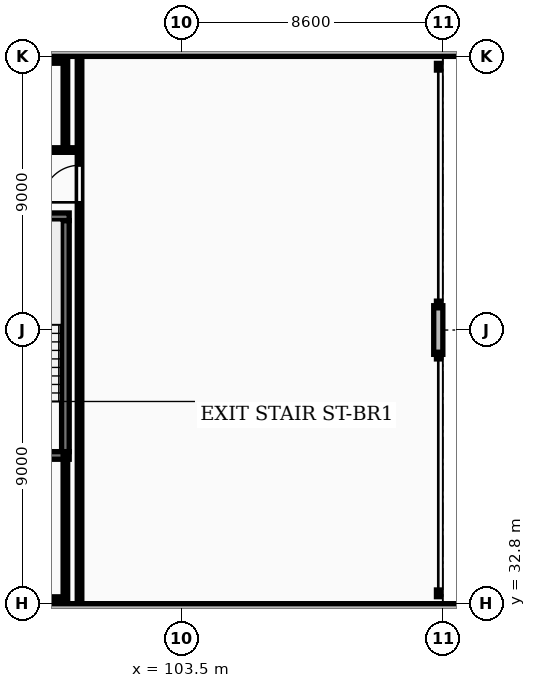
"""IFC4 building model, lengths in metres.
Left out: names, types, materials, properties, quantities, classifications, styles, units other than length and angle.
Written with IfcOpenShell. Run it as: python <this file> out.ifc"""

import sys

from ifc_helpers import new_model, si_unit, direction, frame, frame_2d, origin, place, context, subcontext, project, spatial, rectangle, extrude, element, fill, save


model = new_model("IFC4")
c1 = context("Model", 3, precision=1e-05, world=origin(), true_north=direction((0.0, 1.0)))
c2 = subcontext(c1, "Body", "Model", "MODEL_VIEW")
j1 = project(units=[si_unit("LENGTHUNIT", "METRE"), si_unit("PLANEANGLEUNIT", "RADIAN")], contexts=[c1])
p1 = place(None, origin())
s1 = spatial("IfcSite", under=j1, at=p1, CompositionType="ELEMENT")
p2 = place(p1, origin())
s2 = spatial("IfcBuilding", under=s1, at=p2, CompositionType="ELEMENT")
p3 = place(p2, frame((0.0, 0.0, 150.1)))
s3 = spatial("IfcBuildingStorey", under=s2, at=p3, CompositionType="ELEMENT", Elevation=150.1)
p4 = place(p3, frame((57.6, 50.95, 0.0), z_axis=(0.0, 0.0, 1.0), x_axis=(1.0, 0.0, 0.0)))
e1 = element("IfcWall", 1, at=p4, inside=s3, PredefinedType="STANDARD", context=c2, shape_type="SweptSolid", body=[
    extrude(rectangle(XDim=73.0, YDim=0.3, at=frame_2d((36.5, 0.0))), origin(), (0.0, 0.0, 1.0), 3.31),
])
p5 = place(p4, frame((15.225, 0.0, 0.85)))
e2 = element("IfcOpeningElement", 2, at=p5, cuts=e1, PredefinedType="OPENING", context=c2, shape_type="SweptSolid", body=[
    extrude(rectangle(XDim=1.8, YDim=1.8, at=frame_2d((0.9, 0.9))), frame((0.0, 0.16, 0.0), z_axis=(0.0, -1.0, 0.0), x_axis=(1.0, 0.0, 0.0)), (0.0, 0.0, 1.0), 0.32),
])
p6 = place(p4, frame((58.575, 0.0, 0.85)))
e3 = element("IfcOpeningElement", 3, at=p6, cuts=e1, PredefinedType="OPENING", context=c2, shape_type="SweptSolid", body=[
    extrude(rectangle(XDim=1.8, YDim=1.8, at=frame_2d((0.9, 0.9))), frame((0.0, 0.16, 0.0), z_axis=(0.0, -1.0, 0.0), x_axis=(1.0, 0.0, 0.0)), (0.0, 0.0, 1.0), 0.32),
])
p7 = place(p4, frame((33.45, 0.0, 0.0)))
e4 = element("IfcOpeningElement", 4, at=p7, cuts=e1, PredefinedType="OPENING", context=c2, shape_type="SweptSolid", body=[
    extrude(rectangle(XDim=1.1, YDim=2.1, at=frame_2d((0.55, 1.05))), frame((0.0, 0.16, 0.0), z_axis=(0.0, -1.0, 0.0), x_axis=(1.0, 0.0, 0.0)), (0.0, 0.0, 1.0), 0.32),
])
p8 = place(p3, frame((130.7, 32.65, 0.0), z_axis=(0.0, 0.0, 1.0), x_axis=(-1.0, 0.0, 0.0)))
e5 = element("IfcWall", 5, at=p8, inside=s3, PredefinedType="STANDARD", context=c2, shape_type="SweptSolid", body=[
    extrude(rectangle(XDim=58.0, YDim=0.3, at=frame_2d((29.0, 0.0))), origin(), (0.0, 0.0, 1.0), 3.31),
])
p9 = place(p8, frame((50.125, 0.0, 0.85)))
e6 = element("IfcOpeningElement", 6, at=p9, cuts=e5, PredefinedType="OPENING", context=c2, shape_type="SweptSolid", body=[
    extrude(rectangle(XDim=1.8, YDim=1.8, at=frame_2d((0.9, 0.9))), frame((0.0, 0.16, 0.0), z_axis=(0.0, -1.0, 0.0), x_axis=(1.0, 0.0, 0.0)), (0.0, 0.0, 1.0), 0.32),
])
p10 = place(p8, frame((6.775, 0.0, 0.85)))
e7 = element("IfcOpeningElement", 7, at=p10, cuts=e5, PredefinedType="OPENING", context=c2, shape_type="SweptSolid", body=[
    extrude(rectangle(XDim=1.8, YDim=1.8, at=frame_2d((0.9, 0.9))), frame((0.0, 0.16, 0.0), z_axis=(0.0, -1.0, 0.0), x_axis=(1.0, 0.0, 0.0)), (0.0, 0.0, 1.0), 0.32),
])
p11 = place(p8, frame((38.0, 0.0, 0.0)))
e8 = element("IfcOpeningElement", 8, at=p11, cuts=e5, PredefinedType="OPENING", context=c2, shape_type="SweptSolid", body=[
    extrude(rectangle(XDim=1.1, YDim=2.1, at=frame_2d((0.55, 1.05))), frame((0.0, 0.16, 0.0), z_axis=(0.0, -1.0, 0.0), x_axis=(1.0, 0.0, 0.0)), (0.0, 0.0, 1.0), 0.32),
])
p12 = place(p3, frame((111.95, 41.0, 0.0), z_axis=(0.0, 0.0, 1.0), x_axis=(0.0, 1.0, 0.0)))
e9 = element("IfcWall", 9, at=p12, inside=s3, PredefinedType="STANDARD", context=c2, shape_type="SweptSolid", body=[
    extrude(rectangle(XDim=1.6, YDim=0.3, at=frame_2d((0.8, 0.0))), origin(), (0.0, 0.0, 1.0), 2.38),
])
p13 = place(p3, frame((99.685, 37.8, 0.0), z_axis=(0.0, 0.0, 1.0), x_axis=(0.0, 1.0, 0.0)))
e10 = element("IfcWall", 10, at=p13, inside=s3, PredefinedType="SHEAR", context=c2, shape_type="SweptSolid", body=[
    extrude(rectangle(XDim=7.6, YDim=0.25, at=frame_2d((3.8, 0.0))), origin(), (0.0, 0.0, 1.0), 3.6),
])
for number, where, z_axis, x_axis in (
    (11, (96.25, 37.675, 0.0), (0.0, 0.0, 1.0), (1.0, 0.0, 0.0)),
    (12, (96.25, 45.525, 0.0), (0.0, 0.0, 1.0), (1.0, 0.0, 0.0)),
):
    element("IfcWall", number, at=place(p3, frame(where, z_axis=z_axis, x_axis=x_axis)), inside=s3, PredefinedType="SHEAR", context=c2, shape_type="SweptSolid", body=[
        extrude(rectangle(XDim=3.56, YDim=0.25, at=frame_2d((1.78, 0.0))), origin(), (0.0, 0.0, 1.0), 3.6),
    ])
for number, where, z_axis, x_axis in (
    (13, (96.375, 32.95, 0.0), (0.0, 0.0, 1.0), (1.0, 0.0, 0.0)),
    (14, (96.375, 50.65, 0.0), (0.0, 0.0, 1.0), (1.0, 0.0, 0.0)),
):
    element("IfcWall", number, at=place(p3, frame(where, z_axis=z_axis, x_axis=x_axis)), inside=s3, PredefinedType="PARTITIONING", context=c2, shape_type="SweptSolid", body=[
        extrude(rectangle(XDim=3.31, YDim=0.15, at=frame_2d((1.655, 0.0))), origin(), (0.0, 0.0, 1.0), 2.69),
    ])
p14 = place(p3, frame((96.375, 47.72, 0.0), z_axis=(0.0, 0.0, 1.0), x_axis=(1.0, 0.0, 0.0)))
e15 = element("IfcWall", 15, at=p14, inside=s3, PredefinedType="PARTITIONING", context=c2, shape_type="SweptSolid", body=[
    extrude(rectangle(XDim=3.775, YDim=0.15, at=frame_2d((1.887, 0.0))), origin(), (0.0, 0.0, 1.0), 3.31),
])
p15 = place(p3, frame((99.685, 32.95, 0.0), z_axis=(0.0, 0.0, 1.0), x_axis=(0.0, 1.0, 0.0)))
e16 = element("IfcWall", 16, at=p15, inside=s3, PredefinedType="PARTITIONING", context=c2, shape_type="SweptSolid", body=[
    extrude(rectangle(XDim=4.725, YDim=0.15, at=frame_2d((2.363, 0.0))), origin(), (0.0, 0.0, 1.0), 2.389),
])
p16 = place(p3, frame((99.685, 47.72, 0.0), z_axis=(0.0, 0.0, 1.0), x_axis=(0.0, 1.0, 0.0)))
e17 = element("IfcWall", 17, at=p16, inside=s3, PredefinedType="PARTITIONING", context=c2, shape_type="SweptSolid", body=[
    extrude(rectangle(XDim=2.93, YDim=0.15, at=frame_2d((1.465, 0.0))), origin(), (0.0, 0.0, 1.0), 2.389),
])
p17 = place(p3, frame((100.15, 32.9, 0.0), z_axis=(0.0, 0.0, 1.0), x_axis=(0.0, 1.0, 0.0)))
e18 = element("IfcWall", 18, at=p17, inside=s3, PredefinedType="PARTITIONING", context=c2, shape_type="SweptSolid", body=[
    extrude(rectangle(XDim=17.8, YDim=0.15, at=frame_2d((8.9, 0.0))), origin(), (0.0, 0.0, 1.0), 3.31),
])
p18 = place(p17, frame((13.1, 0.0, 0.0)))
e19 = element("IfcOpeningElement", 19, at=p18, cuts=e18, PredefinedType="OPENING", context=c2, shape_type="SweptSolid", body=[
    extrude(rectangle(XDim=1.22, YDim=2.18, at=frame_2d((0.61, 1.09))), frame((0.0, 0.085, 0.0), z_axis=(0.0, -1.0, 0.0), x_axis=(1.0, 0.0, 0.0)), (0.0, 0.0, 1.0), 0.17),
])
p19 = place(p18, origin())
e20 = element("IfcDoor", 20, at=p19, inside=s3, OperationType="SINGLE_SWING_LEFT", PredefinedType="DOOR", context=c2, shape_type="SweptSolid", body=[
    extrude(rectangle(XDim=1.22, YDim=2.18, at=frame_2d((0.61, 1.09))), frame((0.0, 0.025, 0.0), z_axis=(0.0, -1.0, 0.0), x_axis=(1.0, 0.0, 0.0)), (0.0, 0.0, 1.0), 0.05),
])
fill(e19, e20)
save(model, sys.argv[1])
